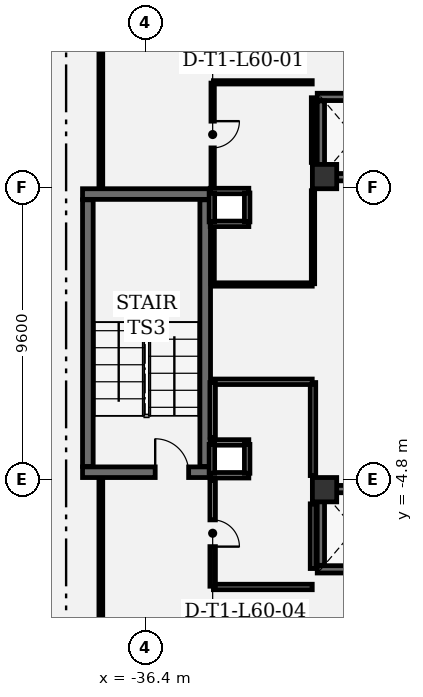
"""IFC4 building model, lengths in metres.
Left out: names, types, materials, properties, quantities, classifications, styles, units other than length and angle.
Written with IfcOpenShell. Run it as: python <this file> out.ifc"""

import sys

from ifc_helpers import new_model, si_unit, direction, frame, frame_2d, origin, origin_2d, place, context, subcontext, project, spatial, rectangle, extrude, element, fill, save


model = new_model("IFC4")
c1 = context("Model", 3, precision=1e-05, world=origin(), true_north=direction((0.0, 1.0)))
c2 = subcontext(c1, "Body", "Model", "MODEL_VIEW")
j1 = project(units=[si_unit("LENGTHUNIT", "METRE"), si_unit("PLANEANGLEUNIT", "RADIAN")], contexts=[c1])
p1 = place(None, origin())
s1 = spatial("IfcSite", under=j1, at=p1, CompositionType="ELEMENT")
p2 = place(p1, origin())
s2 = spatial("IfcBuilding", under=s1, at=p2, CompositionType="ELEMENT")
p3 = place(p2, frame((0.0, 0.0, 259.8)))
s3 = spatial("IfcBuildingStorey", under=s2, at=p3, CompositionType="ELEMENT", Elevation=259.8)
for number, where, z_axis, x_axis in (
    (1, (-30.5, 5.15, 0.0), (0.0, 0.0, 1.0), (1.0, 0.0, 0.0)),
    (2, (-30.5, -5.15, 0.0), (0.0, 0.0, 1.0), (1.0, 0.0, 0.0)),
):
    element("IfcColumn", number, at=place(p3, frame(where, z_axis=z_axis, x_axis=x_axis)), inside=s3, PredefinedType="COLUMN", context=c2, shape_type="SweptSolid", body=[
        extrude(rectangle(XDim=0.8, YDim=0.8, at=origin_2d()), origin(), (0.0, 0.0, 1.0), 4.2),
    ])
p4 = place(p3, frame((-38.46, -4.575, 0.0), z_axis=(0.0, 0.0, 1.0), x_axis=(1.0, 0.0, 0.0)))
e3 = element("IfcWall", 3, at=p4, inside=s3, PredefinedType="SHEAR", context=c2, shape_type="SweptSolid", body=[
    extrude(rectangle(XDim=4.21, YDim=0.35, at=frame_2d((2.105, 0.0))), origin(), (0.0, 0.0, 1.0), 3.91),
])
p5 = place(p4, frame((2.39, 0.0, 0.0)))
e4 = element("IfcOpeningElement", 4, at=p5, cuts=e3, PredefinedType="OPENING", context=c2, shape_type="SweptSolid", body=[
    extrude(rectangle(XDim=1.1, YDim=2.2, at=frame_2d((0.55, 1.1))), frame((0.0, 0.185, 0.0), z_axis=(0.0, -1.0, 0.0), x_axis=(1.0, 0.0, 0.0)), (0.0, 0.0, 1.0), 0.37),
])
p6 = place(p3, frame((-34.25, 4.575, 0.0), z_axis=(0.0, 0.0, 1.0), x_axis=(-1.0, 0.0, 0.0)))
e5 = element("IfcWall", 5, at=p6, inside=s3, PredefinedType="SHEAR", context=c2, shape_type="SweptSolid", body=[
    extrude(rectangle(XDim=4.21, YDim=0.35, at=frame_2d((2.105, 0.0))), origin(), (0.0, 0.0, 1.0), 3.91),
])
for number, where, z_axis, x_axis in (
    (6, (-34.425, -4.385, 0.0), (0.0, 0.0, 1.0), (0.0, 1.0, 0.0)),
    (7, (-38.285, 4.385, 0.0), (0.0, 0.0, 1.0), (0.0, -1.0, 0.0)),
):
    element("IfcWall", number, at=place(p3, frame(where, z_axis=z_axis, x_axis=x_axis)), inside=s3, PredefinedType="SHEAR", context=c2, shape_type="SweptSolid", body=[
        extrude(rectangle(XDim=8.77, YDim=0.35, at=frame_2d((4.385, 0.0))), origin(), (0.0, 0.0, 1.0), 3.91),
    ])
for number, where, z_axis, x_axis in (
    (8, (-28.26, 5.13, 0.0), (0.0, 0.0, 1.0), (-1.0, 0.0, 0.0)),
    (9, (-30.74, 7.77, 0.0), (0.0, 0.0, 1.0), (1.0, 0.0, 0.0)),
):
    element("IfcWall", number, at=place(p3, frame(where, z_axis=z_axis, x_axis=x_axis)), inside=s3, PredefinedType="SHEAR", context=c2, shape_type="SweptSolid", body=[
        extrude(rectangle(XDim=2.48, YDim=0.24, at=frame_2d((1.24, 0.0))), origin(), (0.0, 0.0, 1.0), 3.91),
    ])
p7 = place(p3, frame((-30.62, 5.262, 0.0), z_axis=(0.0, 0.0, 1.0), x_axis=(0.0, 1.0, 0.0)))
e10 = element("IfcWall", 10, at=p7, inside=s3, PredefinedType="SHEAR", context=c2, shape_type="SweptSolid", body=[
    extrude(rectangle(XDim=2.376, YDim=0.24, at=frame_2d((1.188, 0.0))), origin(), (0.0, 0.0, 1.0), 3.91),
])
for number, where, z_axis, x_axis in (
    (11, (-28.26, -7.77, 0.0), (0.0, 0.0, 1.0), (-1.0, 0.0, 0.0)),
    (12, (-30.74, -5.13, 0.0), (0.0, 0.0, 1.0), (1.0, 0.0, 0.0)),
):
    element("IfcWall", number, at=place(p3, frame(where, z_axis=z_axis, x_axis=x_axis)), inside=s3, PredefinedType="SHEAR", context=c2, shape_type="SweptSolid", body=[
        extrude(rectangle(XDim=2.48, YDim=0.24, at=frame_2d((1.24, 0.0))), origin(), (0.0, 0.0, 1.0), 3.91),
    ])
p8 = place(p3, frame((-30.62, -7.638, 0.0), z_axis=(0.0, 0.0, 1.0), x_axis=(0.0, 1.0, 0.0)))
e13 = element("IfcWall", 13, at=p8, inside=s3, PredefinedType="SHEAR", context=c2, shape_type="SweptSolid", body=[
    extrude(rectangle(XDim=2.376, YDim=0.24, at=frame_2d((1.188, 0.0))), origin(), (0.0, 0.0, 1.0), 3.91),
])
for number, where, z_axis, x_axis in (
    (14, (-32.99, 3.595, 0.0), (0.0, 0.0, 1.0), (-1.0, 0.0, 0.0)),
    (15, (-34.26, 4.675, 0.0), (0.0, 0.0, 1.0), (1.0, 0.0, 0.0)),
):
    element("IfcWall", number, at=place(p3, frame(where, z_axis=z_axis, x_axis=x_axis)), inside=s3, PredefinedType="PARTITIONING", context=c2, shape_type="SweptSolid", body=[
        extrude(rectangle(XDim=1.27, YDim=0.18, at=frame_2d((0.635, 0.0))), origin(), (0.0, 0.0, 1.0), 3.91),
    ])
for number, where, z_axis, x_axis in (
    (16, (-34.205, 3.66, 0.0), (0.0, 0.0, 1.0), (0.0, 1.0, 0.0)),
    (17, (-33.045, 4.61, 0.0), (0.0, 0.0, 1.0), (0.0, -1.0, 0.0)),
):
    element("IfcWall", number, at=place(p3, frame(where, z_axis=z_axis, x_axis=x_axis)), inside=s3, PredefinedType="PARTITIONING", context=c2, shape_type="SweptSolid", body=[
        extrude(rectangle(XDim=0.95, YDim=0.18, at=frame_2d((0.475, 0.0))), origin(), (0.0, 0.0, 1.0), 3.91),
    ])
for number, where, z_axis, x_axis in (
    (18, (-32.99, -4.675, 0.0), (0.0, 0.0, 1.0), (-1.0, 0.0, 0.0)),
    (19, (-34.26, -3.595, 0.0), (0.0, 0.0, 1.0), (1.0, 0.0, 0.0)),
):
    element("IfcWall", number, at=place(p3, frame(where, z_axis=z_axis, x_axis=x_axis)), inside=s3, PredefinedType="PARTITIONING", context=c2, shape_type="SweptSolid", body=[
        extrude(rectangle(XDim=1.27, YDim=0.18, at=frame_2d((0.635, 0.0))), origin(), (0.0, 0.0, 1.0), 3.91),
    ])
for number, where, z_axis, x_axis in (
    (20, (-34.205, -4.61, 0.0), (0.0, 0.0, 1.0), (0.0, 1.0, 0.0)),
    (21, (-33.045, -3.66, 0.0), (0.0, 0.0, 1.0), (0.0, -1.0, 0.0)),
):
    element("IfcWall", number, at=place(p3, frame(where, z_axis=z_axis, x_axis=x_axis)), inside=s3, PredefinedType="PARTITIONING", context=c2, shape_type="SweptSolid", body=[
        extrude(rectangle(XDim=0.95, YDim=0.18, at=frame_2d((0.475, 0.0))), origin(), (0.0, 0.0, 1.0), 3.91),
    ])
p9 = place(p3, frame((-34.155, 1.6, 0.0), z_axis=(0.0, 0.0, 1.0), x_axis=(1.0, 0.0, 0.0)))
e22 = element("IfcWall", 22, at=p9, inside=s3, PredefinedType="PARTITIONING", context=c2, shape_type="SweptSolid", body=[
    extrude(rectangle(XDim=3.25, YDim=0.11, at=frame_2d((1.625, 0.0))), origin(), (0.0, 0.0, 1.0), 3.91),
])
p10 = place(p3, frame((-30.88, 1.625, 0.0), z_axis=(0.0, 0.0, 1.0), x_axis=(0.0, 1.0, 0.0)))
e23 = element("IfcWall", 23, at=p10, inside=s3, PredefinedType="PARTITIONING", context=c2, shape_type="SweptSolid", body=[
    extrude(rectangle(XDim=3.06, YDim=0.11, at=frame_2d((1.53, 0.0))), origin(), (0.0, 0.0, 1.0), 3.91),
])
p11 = place(p3, frame((-30.88, 5.615, 0.0), z_axis=(0.0, 0.0, 1.0), x_axis=(0.0, 1.0, 0.0)))
e24 = element("IfcWall", 24, at=p11, inside=s3, PredefinedType="PARTITIONING", context=c2, shape_type="SweptSolid", body=[
    extrude(rectangle(XDim=2.128, YDim=0.11, at=frame_2d((1.064, 0.0))), origin(), (0.0, 0.0, 1.0), 3.91),
])
p12 = place(p3, frame((-30.905, 8.25, 0.0), z_axis=(0.0, 0.0, 1.0), x_axis=(-1.0, 0.0, 0.0)))
e25 = element("IfcWall", 25, at=p12, inside=s3, PredefinedType="PARTITIONING", context=c2, shape_type="SweptSolid", body=[
    extrude(rectangle(XDim=3.25, YDim=0.11, at=frame_2d((1.625, 0.0))), origin(), (0.0, 0.0, 1.0), 3.529),
])
p13 = place(p3, frame((-34.18, 8.225, 0.0), z_axis=(0.0, 0.0, 1.0), x_axis=(0.0, -1.0, 0.0)))
e26 = element("IfcWall", 26, at=p13, inside=s3, PredefinedType="PARTITIONING", context=c2, shape_type="SweptSolid", body=[
    extrude(rectangle(XDim=3.385, YDim=0.11, at=frame_2d((1.692, 0.0))), origin(), (0.0, 0.0, 1.0), 3.91),
])
p14 = place(p13, frame((1.252, 0.0, 0.0)))
e27 = element("IfcOpeningElement", 27, at=p14, cuts=e26, PredefinedType="OPENING", context=c2, shape_type="SweptSolid", body=[
    extrude(rectangle(XDim=0.88, YDim=2.1, at=frame_2d((0.44, 1.05))), frame((0.0, 0.065, 0.0), z_axis=(0.0, -1.0, 0.0), x_axis=(1.0, 0.0, 0.0)), (0.0, 0.0, 1.0), 0.13),
])
p15 = place(p3, frame((-34.18, 3.43, 0.0), z_axis=(0.0, 0.0, 1.0), x_axis=(0.0, -1.0, 0.0)))
e28 = element("IfcWall", 28, at=p15, inside=s3, PredefinedType="PARTITIONING", context=c2, shape_type="SweptSolid", body=[
    extrude(rectangle(XDim=1.805, YDim=0.11, at=frame_2d((0.902, 0.0))), origin(), (0.0, 0.0, 1.0), 3.91),
])
p16 = place(p3, frame((-34.155, -8.35, 0.0), z_axis=(0.0, 0.0, 1.0), x_axis=(1.0, 0.0, 0.0)))
e29 = element("IfcWall", 29, at=p16, inside=s3, PredefinedType="PARTITIONING", context=c2, shape_type="SweptSolid", body=[
    extrude(rectangle(XDim=3.25, YDim=0.18, at=frame_2d((1.625, 0.0))), origin(), (0.0, 0.0, 1.0), 3.529),
])
p17 = place(p3, frame((-30.88, -7.743, 0.0), z_axis=(0.0, 0.0, 1.0), x_axis=(0.0, 1.0, 0.0)))
e30 = element("IfcWall", 30, at=p17, inside=s3, PredefinedType="PARTITIONING", context=c2, shape_type="SweptSolid", body=[
    extrude(rectangle(XDim=2.128, YDim=0.18, at=frame_2d((1.064, 0.0))), origin(), (0.0, 0.0, 1.0), 3.91),
])
p18 = place(p3, frame((-30.88, -4.685, 0.0), z_axis=(0.0, 0.0, 1.0), x_axis=(0.0, 1.0, 0.0)))
e31 = element("IfcWall", 31, at=p18, inside=s3, PredefinedType="PARTITIONING", context=c2, shape_type="SweptSolid", body=[
    extrude(rectangle(XDim=3.06, YDim=0.18, at=frame_2d((1.53, 0.0))), origin(), (0.0, 0.0, 1.0), 3.91),
])
p19 = place(p3, frame((-30.905, -1.6, 0.0), z_axis=(0.0, 0.0, 1.0), x_axis=(-1.0, 0.0, 0.0)))
e32 = element("IfcWall", 32, at=p19, inside=s3, PredefinedType="PARTITIONING", context=c2, shape_type="SweptSolid", body=[
    extrude(rectangle(XDim=3.25, YDim=0.18, at=frame_2d((1.625, 0.0))), origin(), (0.0, 0.0, 1.0), 3.91),
])
p20 = place(p3, frame((-34.18, -1.625, 0.0), z_axis=(0.0, 0.0, 1.0), x_axis=(0.0, -1.0, 0.0)))
e33 = element("IfcWall", 33, at=p20, inside=s3, PredefinedType="PARTITIONING", context=c2, shape_type="SweptSolid", body=[
    extrude(rectangle(XDim=1.805, YDim=0.18, at=frame_2d((0.902, 0.0))), origin(), (0.0, 0.0, 1.0), 3.91),
])
p21 = place(p3, frame((-34.18, -4.84, 0.0), z_axis=(0.0, 0.0, 1.0), x_axis=(0.0, -1.0, 0.0)))
e34 = element("IfcWall", 34, at=p21, inside=s3, PredefinedType="PARTITIONING", context=c2, shape_type="SweptSolid", body=[
    extrude(rectangle(XDim=3.485, YDim=0.18, at=frame_2d((1.743, 0.0))), origin(), (0.0, 0.0, 1.0), 3.91),
])
p22 = place(p21, frame((1.302, 0.0, 0.0)))
e35 = element("IfcOpeningElement", 35, at=p22, cuts=e34, PredefinedType="OPENING", context=c2, shape_type="SweptSolid", body=[
    extrude(rectangle(XDim=0.88, YDim=2.1, at=frame_2d((0.44, 1.05))), frame((0.0, 0.1, 0.0), z_axis=(0.0, -1.0, 0.0), x_axis=(1.0, 0.0, 0.0)), (0.0, 0.0, 1.0), 0.2),
])
p23 = place(p3, frame((-37.858, -4.783, 0.0), z_axis=(0.0, 0.0, 1.0), x_axis=(0.0, -1.0, 0.0)))
e36 = element("IfcWall", 36, at=p23, inside=s3, PredefinedType="PARTITIONING", context=c2, shape_type="SweptSolid", body=[
    extrude(rectangle(XDim=6.912, YDim=0.125, at=frame_2d((3.456, 0.0))), origin(), (0.0, 0.0, 1.0), 3.91),
])
p24 = place(p3, frame((-37.858, 10.733, 0.0), z_axis=(0.0, 0.0, 1.0), x_axis=(0.0, -1.0, 0.0)))
e37 = element("IfcWall", 37, at=p24, inside=s3, PredefinedType="PARTITIONING", context=c2, shape_type="SweptSolid", body=[
    extrude(rectangle(XDim=5.95, YDim=0.125, at=frame_2d((2.975, 0.0))), origin(), (0.0, 0.0, 1.0), 3.91),
])
p25 = place(p5, origin())
e38 = element("IfcDoor", 38, at=p25, inside=s3, OperationType="SINGLE_SWING_LEFT", PredefinedType="DOOR", context=c2, shape_type="SweptSolid", body=[
    extrude(rectangle(XDim=1.1, YDim=2.2, at=frame_2d((0.55, 1.1))), frame((0.0, 0.025, 0.0), z_axis=(0.0, -1.0, 0.0), x_axis=(1.0, 0.0, 0.0)), (0.0, 0.0, 1.0), 0.05),
])
fill(e4, e38)
p26 = place(p14, origin())
e39 = element("IfcDoor", 39, at=p26, inside=s3, OperationType="SINGLE_SWING_LEFT", PredefinedType="DOOR", context=c2, shape_type="SweptSolid", body=[
    extrude(rectangle(XDim=0.88, YDim=2.1, at=frame_2d((0.44, 1.05))), frame((0.0, 0.025, 0.0), z_axis=(0.0, -1.0, 0.0), x_axis=(1.0, 0.0, 0.0)), (0.0, 0.0, 1.0), 0.05),
])
fill(e27, e39)
p27 = place(p22, origin())
e40 = element("IfcDoor", 40, at=p27, inside=s3, OperationType="SINGLE_SWING_RIGHT", PredefinedType="DOOR", context=c2, shape_type="SweptSolid", body=[
    extrude(rectangle(XDim=0.88, YDim=2.1, at=frame_2d((0.44, 1.05))), frame((0.0, 0.025, 0.0), z_axis=(0.0, -1.0, 0.0), x_axis=(1.0, 0.0, 0.0)), (0.0, 0.0, 1.0), 0.05),
])
fill(e35, e40)
save(model, sys.argv[1])
